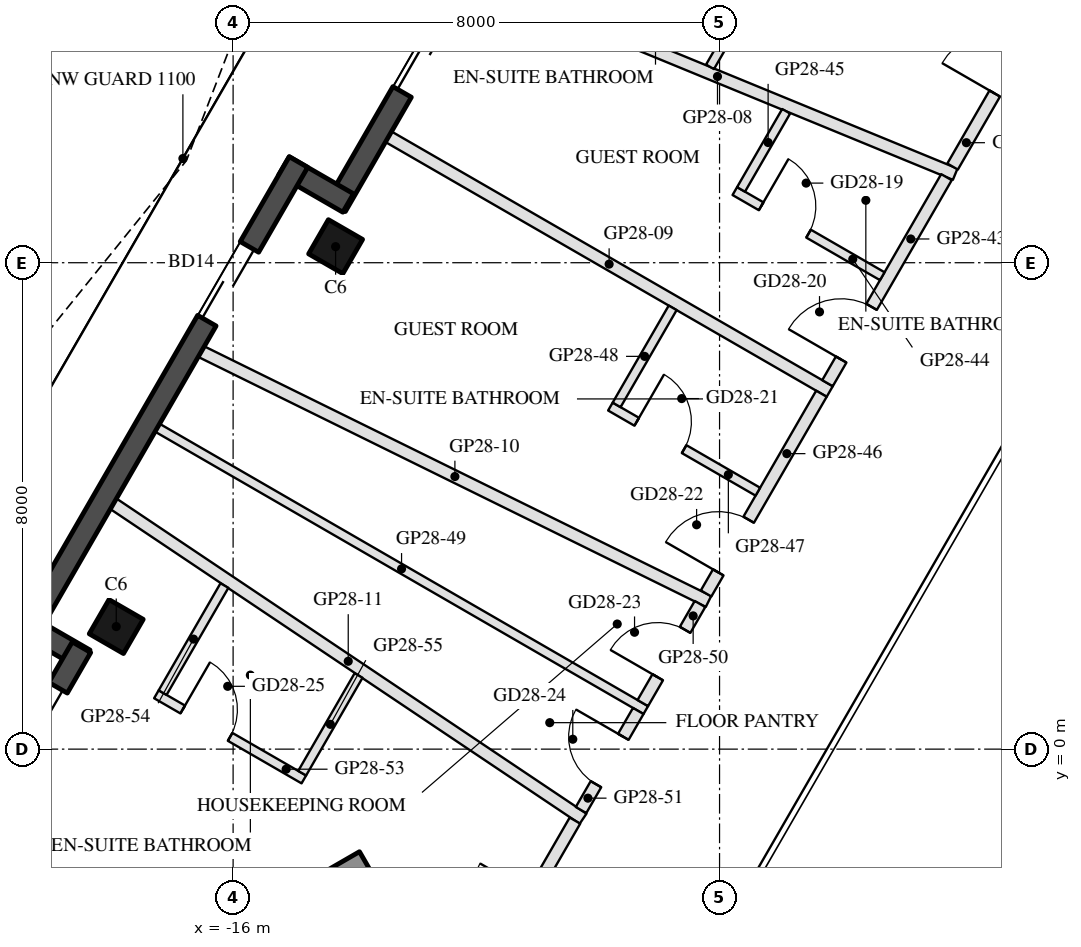
"""IFC4 building model, lengths in metres.
Left out: names, types, materials, properties, quantities, classifications, styles, units other than length and angle.
Written with IfcOpenShell. Run it as: python <this file> out.ifc"""

import sys

from ifc_helpers import new_model, si_unit, direction, frame, frame_2d, origin, origin_2d, place, context, subcontext, project, spatial, rectangle, hollow_rectangle, extrude, boolean, halfspace, element, fill, save


model = new_model("IFC4")
c1 = context("Model", 3, precision=1e-05, world=origin(), true_north=direction((0.0, 1.0)))
c2 = subcontext(c1, "Body", "Model", "MODEL_VIEW")
j1 = project(units=[si_unit("LENGTHUNIT", "METRE"), si_unit("PLANEANGLEUNIT", "RADIAN")], contexts=[c1])
p1 = place(None, origin())
s1 = spatial("IfcSite", under=j1, at=p1, CompositionType="ELEMENT")
p2 = place(p1, origin())
s2 = spatial("IfcBuilding", under=s1, at=p2, CompositionType="ELEMENT")
p3 = place(p2, frame((0.0, 0.0, 283.7)))
s3 = spatial("IfcBuildingStorey", under=s2, at=p3, CompositionType="ELEMENT", Elevation=283.7)
p4 = place(p3, frame((-14.314, 8.264, 0.0), z_axis=(0.0, 0.0, 1.0), x_axis=(0.5, 0.866025403784, 0.0)))
e1 = element("IfcColumn", 1, at=p4, inside=s3, PredefinedType="COLUMN", context=c2, shape_type="SweptSolid", body=[
    boolean("DIFFERENCE", extrude(hollow_rectangle(XDim=0.65, YDim=0.65, WallThickness=0.03, at=origin_2d()), origin(), (0.0, 0.0, 1.0), 3.7), halfspace(frame((0.0, 0.0, 3.663), z_axis=(0.0, 0.0, 1.0), x_axis=(1.0, 0.0, 0.0)), False)),
])
p5 = place(p3, frame((-17.922, 2.016, 0.0), z_axis=(0.0, 0.0, 1.0), x_axis=(0.5, 0.866025403784, 0.0)))
e2 = element("IfcColumn", 2, at=p5, inside=s3, PredefinedType="COLUMN", context=c2, shape_type="SweptSolid", body=[
    boolean("DIFFERENCE", extrude(hollow_rectangle(XDim=0.65, YDim=0.65, WallThickness=0.03, at=origin_2d()), origin(), (0.0, 0.0, 1.0), 3.7), halfspace(frame((0.0, 0.0, 3.66), z_axis=(0.0, 0.0, 1.0), x_axis=(1.0, 0.0, 0.0)), False)),
])
p6 = place(p3, frame((-11.278, 14.173, 0.0), z_axis=(0.0, 0.0, 1.0), x_axis=(-0.499985371027, -0.866033849661, 0.0)))
e3 = element("IfcWall", 3, at=p6, inside=s3, PredefinedType="SOLIDWALL", context=c2, shape_type="SweptSolid", body=[
    extrude(rectangle(XDim=6.055, YDim=0.35, at=frame_2d((3.028, 0.0))), origin(), (0.0, 0.0, 1.0), 3.55),
])
p7 = place(p6, frame((0.32, 0.0, 0.3)))
e4 = element("IfcOpeningElement", 4, at=p7, cuts=e3, PredefinedType="OPENING", context=c2, shape_type="SweptSolid", body=[
    extrude(rectangle(XDim=0.8, YDim=2.65, at=frame_2d((0.4, 1.325))), frame((0.0, 0.185, 0.0), z_axis=(0.0, -1.0, 0.0), x_axis=(1.0, 0.0, 0.0)), (0.0, 0.0, 1.0), 0.37),
])
p8 = place(p6, frame((2.384, 0.0, 0.0)))
e5 = element("IfcOpeningElement", 5, at=p8, cuts=e3, PredefinedType="OPENING", context=c2, shape_type="SweptSolid", body=[
    extrude(rectangle(XDim=1.5, YDim=2.4, at=frame_2d((0.75, 1.2))), frame((0.0, 0.185, 0.0), z_axis=(0.0, -1.0, 0.0), x_axis=(1.0, 0.0, 0.0)), (0.0, 0.0, 1.0), 0.37),
])
p9 = place(p3, frame((-14.108, 8.982, 0.0), z_axis=(0.0, 0.0, 1.0), x_axis=(-0.866005645448, 0.500034220881, 0.0)))
e6 = element("IfcWall", 6, at=p9, inside=s3, PredefinedType="SOLIDWALL", context=c2, shape_type="SweptSolid", body=[
    extrude(rectangle(XDim=1.22, YDim=0.35, at=frame_2d((0.61, 0.0))), origin(), (0.0, 0.0, 1.0), 3.55),
])
p10 = place(p3, frame((-14.925, 9.656, 0.0), z_axis=(0.0, 0.0, 1.0), x_axis=(-0.500018599098, -0.866014665324, 0.0)))
e7 = element("IfcWall", 7, at=p10, inside=s3, PredefinedType="SOLIDWALL", context=c2, shape_type="SweptSolid", body=[
    extrude(rectangle(XDim=9.015, YDim=0.35, at=frame_2d((4.508, 0.0))), origin(), (0.0, 0.0, 1.0), 3.55),
])
p11 = place(p10, frame((1.613, 0.0, 0.0)))
e8 = element("IfcOpeningElement", 8, at=p11, cuts=e7, PredefinedType="OPENING", context=c2, shape_type="SweptSolid", body=[
    extrude(rectangle(XDim=1.4, YDim=2.4, at=frame_2d((0.7, 1.2))), frame((0.0, 0.185, 0.0), z_axis=(0.0, -1.0, 0.0), x_axis=(1.0, 0.0, 0.0)), (0.0, 0.0, 1.0), 0.37),
])
p12 = place(p3, frame((-19.497, 2.088, 0.0), z_axis=(0.0, 0.0, 1.0), x_axis=(0.866005645448, -0.500034220881, 0.0)))
e9 = element("IfcWall", 9, at=p12, inside=s3, PredefinedType="SOLIDWALL", context=c2, shape_type="SweptSolid", body=[
    extrude(rectangle(XDim=1.22, YDim=0.35, at=frame_2d((0.61, 0.0))), origin(), (0.0, 0.0, 1.0), 3.55),
])
p13 = place(p3, frame((-18.493, 1.676, 0.0), z_axis=(0.0, 0.0, 1.0), x_axis=(-0.499985371027, -0.866033849661, 0.0)))
e10 = element("IfcWall", 10, at=p13, inside=s3, PredefinedType="SOLIDWALL", context=c2, shape_type="SweptSolid", body=[
    extrude(rectangle(XDim=6.055, YDim=0.35, at=frame_2d((3.028, 0.0))), origin(), (0.0, 0.0, 1.0), 3.55),
])
p14 = place(p13, frame((0.77, 0.0, 0.0)))
e11 = element("IfcOpeningElement", 11, at=p14, cuts=e10, PredefinedType="OPENING", context=c2, shape_type="SweptSolid", body=[
    extrude(rectangle(XDim=2.4, YDim=2.4, at=frame_2d((1.2, 1.2))), frame((0.0, 0.185, 0.0), z_axis=(0.0, -1.0, 0.0), x_axis=(1.0, 0.0, 0.0)), (0.0, 0.0, 1.0), 0.37),
])
p15 = place(p13, frame((3.47, 0.0, 0.3)))
e12 = element("IfcOpeningElement", 12, at=p15, cuts=e10, PredefinedType="OPENING", context=c2, shape_type="SweptSolid", body=[
    extrude(rectangle(XDim=2.2, YDim=2.65, at=frame_2d((1.1, 1.325))), frame((0.0, 0.185, 0.0), z_axis=(0.0, -1.0, 0.0), x_axis=(1.0, 0.0, 0.0)), (0.0, 0.0, 1.0), 0.37),
])
p16 = place(p3, frame((-13.797, -1.903, 0.0), z_axis=(0.0, 0.0, 1.0), x_axis=(-0.866024688907, -0.500001238203, 0.0)))
e13 = element("IfcWall", 13, at=p16, inside=s3, PredefinedType="SHEAR", context=c2, shape_type="SweptSolid", body=[
    extrude(rectangle(XDim=12.129, YDim=0.5, at=frame_2d((6.064, 0.0))), origin(), (0.0, 0.0, 1.0), 3.5),
])
p17 = place(p3, frame((-11.944, 12.67, 0.0), z_axis=(0.0, 0.0, 1.0), x_axis=(0.924897439871, -0.380216682591, 0.0)))
e14 = element("IfcWall", 14, at=p17, inside=s3, PredefinedType="PARTITIONING", context=c2, shape_type="SweptSolid", body=[
    extrude(rectangle(XDim=8.454, YDim=0.2, at=frame_2d((4.227, 0.0))), origin(), (0.0, 0.0, 1.0), 3.1),
])
p18 = place(p3, frame((-13.444, 10.071, 0.0), z_axis=(0.0, 0.0, 1.0), x_axis=(0.866030795796, -0.499990660646, 0.0)))
e15 = element("IfcWall", 15, at=p18, inside=s3, PredefinedType="PARTITIONING", context=c2, shape_type="SweptSolid", body=[
    extrude(rectangle(XDim=8.379, YDim=0.2, at=frame_2d((4.189, 0.0))), origin(), (0.0, 0.0, 1.0), 3.1),
])
p19 = place(p3, frame((-16.524, 6.538, 0.0), z_axis=(0.0, 0.0, 1.0), x_axis=(0.897120251728, -0.441786434762, 0.0)))
e16 = element("IfcWall", 16, at=p19, inside=s3, PredefinedType="PARTITIONING", context=c2, shape_type="SweptSolid", body=[
    extrude(rectangle(XDim=9.299, YDim=0.2, at=frame_2d((4.649, 0.0))), origin(), (0.0, 0.0, 1.0), 3.1),
])
p20 = place(p3, frame((-17.969, 4.035, 0.0), z_axis=(0.0, 0.0, 1.0), x_axis=(0.830560992963, -0.556927676604, 0.0)))
e17 = element("IfcWall", 17, at=p20, inside=s3, PredefinedType="PARTITIONING", context=c2, shape_type="SweptSolid", body=[
    extrude(rectangle(XDim=9.3, YDim=0.2, at=frame_2d((4.65, 0.0))), origin(), (0.0, 0.0, 1.0), 3.1),
])
p21 = place(p3, frame((-4.167, 9.582, 0.0), z_axis=(0.0, 0.0, 1.0), x_axis=(0.500000579621, 0.86602506914, 0.0)))
e18 = element("IfcWall", 18, at=p21, inside=s3, PredefinedType="PARTITIONING", context=c2, shape_type="SweptSolid", body=[
    extrude(rectangle(XDim=3.774, YDim=0.2, at=frame_2d((1.887, 0.0))), origin(), (0.0, 0.0, 1.0), 3.05),
])
p22 = place(p21, frame((1.387, 0.0, 0.0)))
e19 = element("IfcOpeningElement", 19, at=p22, cuts=e18, PredefinedType="OPENING", context=c2, shape_type="SweptSolid", body=[
    extrude(rectangle(XDim=1.0, YDim=2.1, at=frame_2d((0.5, 1.05))), frame((0.0, 0.11, 0.0), z_axis=(0.0, -1.0, 0.0), x_axis=(1.0, 0.0, 0.0)), (0.0, 0.0, 1.0), 0.22),
])
p23 = place(p3, frame((-7.227, 12.833, 0.0), z_axis=(0.0, 0.0, 1.0), x_axis=(-0.500063286585, -0.865988862174, 0.0)))
e20 = element("IfcWall", 20, at=p23, inside=s3, PredefinedType="PARTITIONING", context=c2, shape_type="SweptSolid", body=[
    extrude(rectangle(XDim=1.86, YDim=0.15, at=frame_2d((0.93, 0.0))), origin(), (0.0, 0.0, 1.0), 3.05),
])
p24 = place(p3, frame((-6.225, 6.019, 0.0), z_axis=(0.0, 0.0, 1.0), x_axis=(0.500024943202, 0.866011002341, 0.0)))
e21 = element("IfcWall", 21, at=p24, inside=s3, PredefinedType="PARTITIONING", context=c2, shape_type="SweptSolid", body=[
    extrude(rectangle(XDim=3.912, YDim=0.2, at=frame_2d((1.956, 0.0))), origin(), (0.0, 0.0, 1.0), 3.05),
])
p25 = place(p24, frame((0.449, 0.0, 0.0)))
e22 = element("IfcOpeningElement", 22, at=p25, cuts=e21, PredefinedType="OPENING", context=c2, shape_type="SweptSolid", body=[
    extrude(rectangle(XDim=1.0, YDim=2.1, at=frame_2d((0.5, 1.05))), frame((0.0, 0.11, 0.0), z_axis=(0.0, -1.0, 0.0), x_axis=(1.0, 0.0, 0.0)), (0.0, 0.0, 1.0), 0.22),
])
p26 = place(p3, frame((-7.749, 9.178, 0.0), z_axis=(0.0, 0.0, 1.0), x_axis=(0.866034573852, -0.49998411664, 0.0)))
e23 = element("IfcWall", 23, at=p26, inside=s3, PredefinedType="PARTITIONING", context=c2, shape_type="SweptSolid", body=[
    extrude(rectangle(XDim=2.8, YDim=0.15, at=frame_2d((1.4, 0.0))), origin(), (0.0, 0.0, 1.0), 3.55),
])
p27 = place(p26, frame((0.5, 0.0, 0.0)))
e24 = element("IfcOpeningElement", 24, at=p27, cuts=e23, PredefinedType="OPENING", context=c2, shape_type="SweptSolid", body=[
    extrude(rectangle(XDim=0.9, YDim=2.1, at=frame_2d((0.45, 1.05))), frame((0.0, 0.085, 0.0), z_axis=(0.0, -1.0, 0.0), x_axis=(1.0, 0.0, 0.0)), (0.0, 0.0, 1.0), 0.17),
])
p28 = place(p3, frame((-6.905, 10.491, 0.0), z_axis=(0.0, 0.0, 1.0), x_axis=(-0.499926630096, -0.866067759775, 0.0)))
e25 = element("IfcWall", 25, at=p28, inside=s3, PredefinedType="PARTITIONING", context=c2, shape_type="SweptSolid", body=[
    extrude(rectangle(XDim=1.484, YDim=0.15, at=frame_2d((0.742, 0.0))), origin(), (0.0, 0.0, 1.0), 3.55),
])
p29 = place(p3, frame((-8.221, 2.561, 0.0), z_axis=(0.0, 0.0, 1.0), x_axis=(0.499988034227, 0.866032312117, 0.0)))
e26 = element("IfcWall", 26, at=p29, inside=s3, PredefinedType="PARTITIONING", context=c2, shape_type="SweptSolid", body=[
    extrude(rectangle(XDim=3.793, YDim=0.2, at=frame_2d((1.896, 0.0))), origin(), (0.0, 0.0, 1.0), 3.05),
])
p30 = place(p29, frame((0.4, 0.0, 0.0)))
e27 = element("IfcOpeningElement", 27, at=p30, cuts=e26, PredefinedType="OPENING", context=c2, shape_type="SweptSolid", body=[
    extrude(rectangle(XDim=1.0, YDim=2.1, at=frame_2d((0.5, 1.05))), frame((0.0, 0.11, 0.0), z_axis=(0.0, -1.0, 0.0), x_axis=(1.0, 0.0, 0.0)), (0.0, 0.0, 1.0), 0.22),
])
p31 = place(p3, frame((-9.795, 5.634, 0.0), z_axis=(0.0, 0.0, 1.0), x_axis=(0.866034573852, -0.49998411664, 0.0)))
e28 = element("IfcWall", 28, at=p31, inside=s3, PredefinedType="PARTITIONING", context=c2, shape_type="SweptSolid", body=[
    extrude(rectangle(XDim=2.8, YDim=0.15, at=frame_2d((1.4, 0.0))), origin(), (0.0, 0.0, 1.0), 3.05),
])
p32 = place(p31, frame((0.5, 0.0, 0.0)))
e29 = element("IfcOpeningElement", 29, at=p32, cuts=e28, PredefinedType="OPENING", context=c2, shape_type="SweptSolid", body=[
    extrude(rectangle(XDim=0.9, YDim=2.1, at=frame_2d((0.45, 1.05))), frame((0.0, 0.085, 0.0), z_axis=(0.0, -1.0, 0.0), x_axis=(1.0, 0.0, 0.0)), (0.0, 0.0, 1.0), 0.17),
])
p33 = place(p3, frame((-8.771, 7.258, 0.0), z_axis=(0.0, 0.0, 1.0), x_axis=(-0.50002820729, -0.866009117685, 0.0)))
e30 = element("IfcWall", 30, at=p33, inside=s3, PredefinedType="PARTITIONING", context=c2, shape_type="SweptSolid", body=[
    extrude(rectangle(XDim=1.843, YDim=0.15, at=frame_2d((0.922, 0.0))), origin(), (0.0, 0.0, 1.0), 3.05),
])
p34 = place(p3, frame((-17.246, 5.286, 0.0), z_axis=(0.0, 0.0, 1.0), x_axis=(0.865746766399, -0.500482303853, 0.0)))
e31 = element("IfcWall", 31, at=p34, inside=s3, PredefinedType="PARTITIONING", context=c2, shape_type="SweptSolid", body=[
    extrude(rectangle(XDim=9.279, YDim=0.15, at=frame_2d((4.639, 0.0))), origin(), (0.0, 0.0, 1.0), 3.1),
])
p35 = place(p3, frame((-9.262, 0.758, 0.0), z_axis=(0.0, 0.0, 1.0), x_axis=(0.500074377092, 0.865982457891, 0.0)))
e32 = element("IfcWall", 32, at=p35, inside=s3, PredefinedType="PARTITIONING", context=c2, shape_type="SweptSolid", body=[
    extrude(rectangle(XDim=1.882, YDim=0.2, at=frame_2d((0.941, 0.0))), origin(), (0.0, 0.0, 1.0), 3.05),
])
p36 = place(p35, frame((0.491, 0.0, 0.0)))
e33 = element("IfcOpeningElement", 33, at=p36, cuts=e32, PredefinedType="OPENING", context=c2, shape_type="SweptSolid", body=[
    extrude(rectangle(XDim=0.9, YDim=2.1, at=frame_2d((0.45, 1.05))), frame((0.0, 0.11, 0.0), z_axis=(0.0, -1.0, 0.0), x_axis=(1.0, 0.0, 0.0)), (0.0, 0.0, 1.0), 0.22),
])
p37 = place(p3, frame((-10.278, -1.002, 0.0), z_axis=(0.0, 0.0, 1.0), x_axis=(0.499977061294, 0.866038647048, 0.0)))
e34 = element("IfcWall", 34, at=p37, inside=s3, PredefinedType="PARTITIONING", context=c2, shape_type="SweptSolid", body=[
    extrude(rectangle(XDim=1.881, YDim=0.2, at=frame_2d((0.941, 0.0))), origin(), (0.0, 0.0, 1.0), 3.55),
])
p38 = place(p37, frame((0.491, 0.0, 0.0)))
e35 = element("IfcOpeningElement", 35, at=p38, cuts=e34, PredefinedType="OPENING", context=c2, shape_type="SweptSolid", body=[
    extrude(rectangle(XDim=0.9, YDim=2.1, at=frame_2d((0.45, 1.05))), frame((0.0, 0.11, 0.0), z_axis=(0.0, -1.0, 0.0), x_axis=(1.0, 0.0, 0.0)), (0.0, 0.0, 1.0), 0.22),
])
p39 = place(p3, frame((-12.269, -4.45, 0.0), z_axis=(0.0, 0.0, 1.0), x_axis=(0.500000040646, 0.866025380318, 0.0)))
e36 = element("IfcWall", 36, at=p39, inside=s3, PredefinedType="PARTITIONING", context=c2, shape_type="SweptSolid", body=[
    extrude(rectangle(XDim=3.781, YDim=0.2, at=frame_2d((1.891, 0.0))), origin(), (0.0, 0.0, 1.0), 3.05),
])
p40 = place(p39, frame((1.391, 0.0, 0.0)))
e37 = element("IfcOpeningElement", 37, at=p40, cuts=e36, PredefinedType="OPENING", context=c2, shape_type="SweptSolid", body=[
    extrude(rectangle(XDim=1.0, YDim=2.1, at=frame_2d((0.5, 1.05))), frame((0.0, 0.11, 0.0), z_axis=(0.0, -1.0, 0.0), x_axis=(1.0, 0.0, 0.0)), (0.0, 0.0, 1.0), 0.22),
])
p41 = place(p3, frame((-17.262, 0.902, 0.0), z_axis=(0.0, 0.0, 1.0), x_axis=(0.866034573852, -0.49998411664, 0.0)))
e38 = element("IfcWall", 38, at=p41, inside=s3, PredefinedType="PARTITIONING", context=c2, shape_type="SweptSolid", body=[
    extrude(rectangle(XDim=2.8, YDim=0.15, at=frame_2d((1.4, 0.0))), origin(), (0.0, 0.0, 1.0), 3.55),
])
p42 = place(p41, frame((0.5, 0.0, 0.0)))
e39 = element("IfcOpeningElement", 39, at=p42, cuts=e38, PredefinedType="OPENING", context=c2, shape_type="SweptSolid", body=[
    extrude(rectangle(XDim=0.9, YDim=2.1, at=frame_2d((0.45, 1.05))), frame((0.0, 0.085, 0.0), z_axis=(0.0, -1.0, 0.0), x_axis=(1.0, 0.0, 0.0)), (0.0, 0.0, 1.0), 0.17),
])
p43 = place(p3, frame((-16.143, 2.69, 0.0), z_axis=(0.0, 0.0, 1.0), x_axis=(-0.500013496215, -0.866017611601, 0.0)))
e40 = element("IfcWall", 40, at=p43, inside=s3, PredefinedType="PARTITIONING", context=c2, shape_type="SweptSolid", body=[
    extrude(rectangle(XDim=2.033, YDim=0.15, at=frame_2d((1.017, 0.0))), origin(), (0.0, 0.0, 1.0), 3.05),
])
p44 = place(p3, frame((-13.937, 1.211, 0.0), z_axis=(0.0, 0.0, 1.0), x_axis=(-0.500003477455, -0.866023396066, 0.0)))
e41 = element("IfcWall", 41, at=p44, inside=s3, PredefinedType="PARTITIONING", context=c2, shape_type="SweptSolid", body=[
    extrude(rectangle(XDim=1.855, YDim=0.15, at=frame_2d((0.927, 0.0))), origin(), (0.0, 0.0, 1.0), 3.05),
])
p45 = place(p8, frame((1.5, 0.0, 0.0), z_axis=(0.0, 0.0, 1.0), x_axis=(-1.0, 0.0, 0.0)))
e42 = element("IfcDoor", 42, at=p45, inside=s3, OperationType="SLIDING_TO_LEFT", PredefinedType="DOOR", context=c2, shape_type="SweptSolid", body=[
    extrude(rectangle(XDim=1.5, YDim=2.4, at=frame_2d((0.75, 1.2))), frame((0.0, 0.025, 0.0), z_axis=(0.0, -1.0, 0.0), x_axis=(1.0, 0.0, 0.0)), (0.0, 0.0, 1.0), 0.05),
])
fill(e5, e42)
p46 = place(p11, frame((1.4, 0.0, 0.0), z_axis=(0.0, 0.0, 1.0), x_axis=(-1.0, 0.0, 0.0)))
e43 = element("IfcDoor", 43, at=p46, inside=s3, OperationType="SLIDING_TO_LEFT", PredefinedType="DOOR", context=c2, shape_type="SweptSolid", body=[
    extrude(rectangle(XDim=1.4, YDim=2.4, at=frame_2d((0.7, 1.2))), frame((0.0, 0.025, 0.0), z_axis=(0.0, -1.0, 0.0), x_axis=(1.0, 0.0, 0.0)), (0.0, 0.0, 1.0), 0.05),
])
fill(e8, e43)
p47 = place(p14, frame((2.4, 0.0, 0.0), z_axis=(0.0, 0.0, 1.0), x_axis=(-1.0, 0.0, 0.0)))
e44 = element("IfcDoor", 44, at=p47, inside=s3, OperationType="SLIDING_TO_LEFT", PredefinedType="DOOR", context=c2, shape_type="SweptSolid", body=[
    extrude(rectangle(XDim=2.4, YDim=2.4, at=frame_2d((1.2, 1.2))), frame((0.0, 0.025, 0.0), z_axis=(0.0, -1.0, 0.0), x_axis=(1.0, 0.0, 0.0)), (0.0, 0.0, 1.0), 0.05),
])
fill(e11, e44)
p48 = place(p22, origin())
e45 = element("IfcDoor", 45, at=p48, inside=s3, OperationType="SINGLE_SWING_LEFT", PredefinedType="DOOR", context=c2, shape_type="SweptSolid", body=[
    extrude(rectangle(XDim=1.0, YDim=2.1, at=frame_2d((0.5, 1.05))), frame((0.0, 0.025, 0.0), z_axis=(0.0, -1.0, 0.0), x_axis=(1.0, 0.0, 0.0)), (0.0, 0.0, 1.0), 0.05),
])
fill(e19, e45)
p49 = place(p27, origin())
e46 = element("IfcDoor", 46, at=p49, inside=s3, OperationType="SINGLE_SWING_LEFT", PredefinedType="DOOR", context=c2, shape_type="SweptSolid", body=[
    extrude(rectangle(XDim=0.9, YDim=2.1, at=frame_2d((0.45, 1.05))), frame((0.0, 0.025, 0.0), z_axis=(0.0, -1.0, 0.0), x_axis=(1.0, 0.0, 0.0)), (0.0, 0.0, 1.0), 0.05),
])
fill(e24, e46)
p50 = place(p25, origin())
e47 = element("IfcDoor", 47, at=p50, inside=s3, OperationType="SINGLE_SWING_LEFT", PredefinedType="DOOR", context=c2, shape_type="SweptSolid", body=[
    extrude(rectangle(XDim=1.0, YDim=2.1, at=frame_2d((0.5, 1.05))), frame((0.0, 0.025, 0.0), z_axis=(0.0, -1.0, 0.0), x_axis=(1.0, 0.0, 0.0)), (0.0, 0.0, 1.0), 0.05),
])
fill(e22, e47)
p51 = place(p32, origin())
e48 = element("IfcDoor", 48, at=p51, inside=s3, OperationType="SINGLE_SWING_LEFT", PredefinedType="DOOR", context=c2, shape_type="SweptSolid", body=[
    extrude(rectangle(XDim=0.9, YDim=2.1, at=frame_2d((0.45, 1.05))), frame((0.0, 0.025, 0.0), z_axis=(0.0, -1.0, 0.0), x_axis=(1.0, 0.0, 0.0)), (0.0, 0.0, 1.0), 0.05),
])
fill(e29, e48)
p52 = place(p30, origin())
e49 = element("IfcDoor", 49, at=p52, inside=s3, OperationType="SINGLE_SWING_LEFT", PredefinedType="DOOR", context=c2, shape_type="SweptSolid", body=[
    extrude(rectangle(XDim=1.0, YDim=2.1, at=frame_2d((0.5, 1.05))), frame((0.0, 0.025, 0.0), z_axis=(0.0, -1.0, 0.0), x_axis=(1.0, 0.0, 0.0)), (0.0, 0.0, 1.0), 0.05),
])
fill(e27, e49)
p53 = place(p36, origin())
e50 = element("IfcDoor", 50, at=p53, inside=s3, OperationType="SINGLE_SWING_LEFT", PredefinedType="DOOR", context=c2, shape_type="SweptSolid", body=[
    extrude(rectangle(XDim=0.9, YDim=2.1, at=frame_2d((0.45, 1.05))), frame((0.0, 0.025, 0.0), z_axis=(0.0, -1.0, 0.0), x_axis=(1.0, 0.0, 0.0)), (0.0, 0.0, 1.0), 0.05),
])
fill(e33, e50)
p54 = place(p38, origin())
e51 = element("IfcDoor", 51, at=p54, inside=s3, OperationType="SINGLE_SWING_RIGHT", PredefinedType="DOOR", context=c2, shape_type="SweptSolid", body=[
    extrude(rectangle(XDim=0.9, YDim=2.1, at=frame_2d((0.45, 1.05))), frame((0.0, 0.025, 0.0), z_axis=(0.0, -1.0, 0.0), x_axis=(1.0, 0.0, 0.0)), (0.0, 0.0, 1.0), 0.05),
])
fill(e35, e51)
p55 = place(p42, origin())
e52 = element("IfcDoor", 52, at=p55, inside=s3, OperationType="SINGLE_SWING_LEFT", PredefinedType="DOOR", context=c2, shape_type="SweptSolid", body=[
    extrude(rectangle(XDim=0.9, YDim=2.1, at=frame_2d((0.45, 1.05))), frame((0.0, 0.025, 0.0), z_axis=(0.0, -1.0, 0.0), x_axis=(1.0, 0.0, 0.0)), (0.0, 0.0, 1.0), 0.05),
])
fill(e39, e52)
save(model, sys.argv[1])
